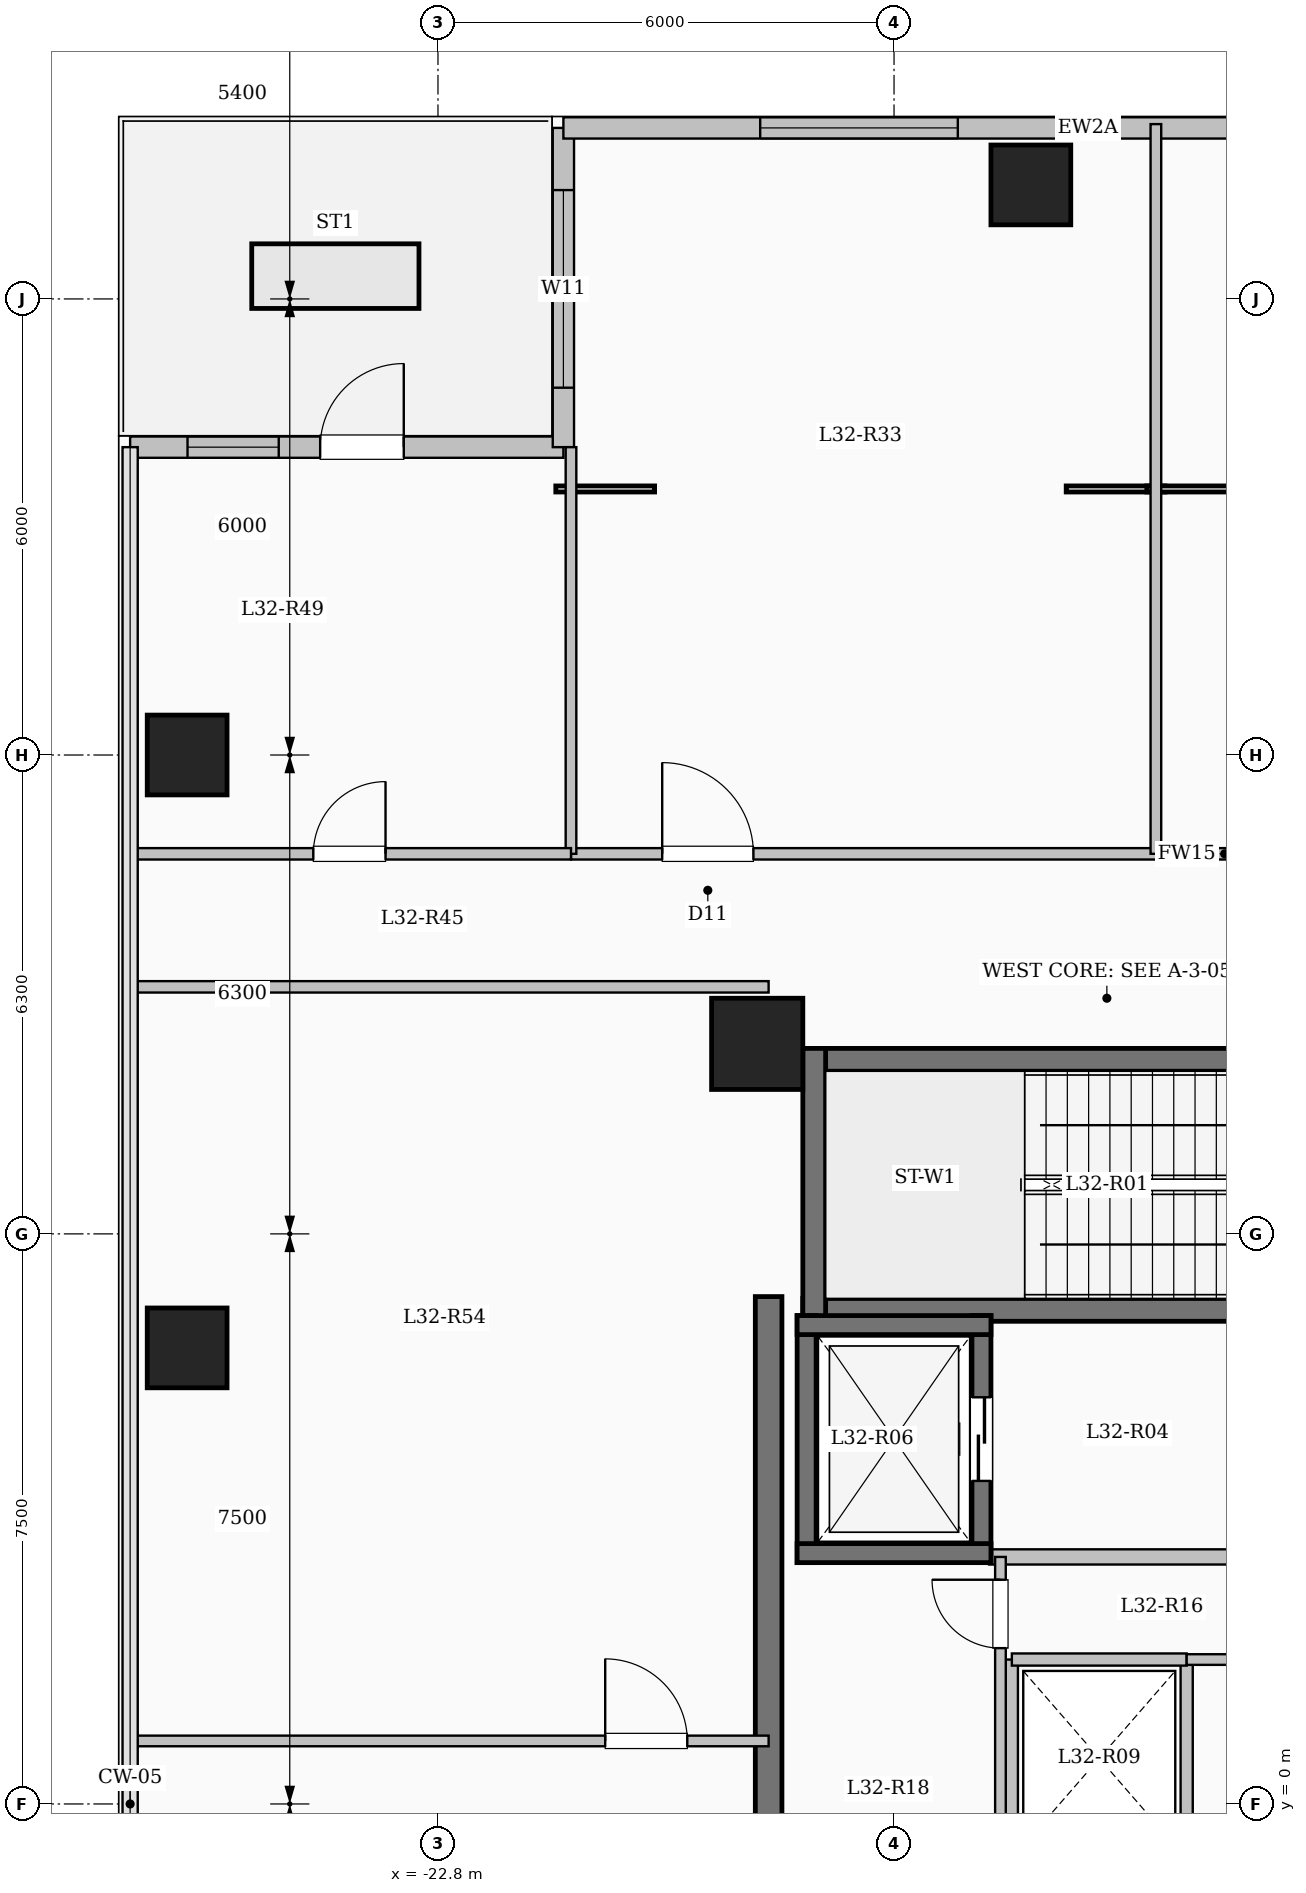
"""IFC4 building model, lengths in metres.
Left out: names, types, materials, properties, quantities, classifications, styles, units other than length and angle.
Written with IfcOpenShell. Run it as: python <this file> out.ifc"""

import sys

from ifc_helpers import new_model, si_unit, direction, frame, frame_2d, origin, origin_2d, place, context, subcontext, project, spatial, rectangle, extrude, element, fill, save


model = new_model("IFC4")
c1 = context("Model", 3, precision=1e-05, world=origin(), true_north=direction((0.0, 1.0)))
c2 = subcontext(c1, "Body", "Model", "MODEL_VIEW")
j1 = project(units=[si_unit("LENGTHUNIT", "METRE"), si_unit("PLANEANGLEUNIT", "RADIAN")], contexts=[c1])
p1 = place(None, origin())
s1 = spatial("IfcSite", under=j1, at=p1, CompositionType="ELEMENT")
p2 = place(p1, origin())
s2 = spatial("IfcBuilding", under=s1, at=p2, CompositionType="ELEMENT")
p3 = place(p2, frame((0.0, 0.0, 118.5)))
s3 = spatial("IfcBuildingStorey", under=s2, at=p3, CompositionType="ELEMENT", Elevation=118.5)
p4 = place(p3, frame((-18.6, 10.0, 0.0), z_axis=(0.0, 0.0, 1.0), x_axis=(1.0, 0.0, 0.0)))
e1 = element("IfcColumn", 1, at=p4, inside=s3, PredefinedType="COLUMN", context=c2, shape_type="SweptSolid", body=[
    extrude(rectangle(XDim=1.2, YDim=1.2, at=origin_2d()), origin(), (0.0, 0.0, 1.0), 4.5),
])
for number, where, z_axis, x_axis in (
    (2, (-15.0, 21.3, 0.0), (0.0, 0.0, 1.0), (1.0, 0.0, 0.0)),
    (3, (-26.1, 6.0, 0.0), (0.0, 0.0, 1.0), (1.0, 0.0, 0.0)),
    (4, (-26.1, 13.8, 0.0), (0.0, 0.0, 1.0), (1.0, 0.0, 0.0)),
):
    element("IfcColumn", number, at=place(p3, frame(where, z_axis=z_axis, x_axis=x_axis)), inside=s3, PredefinedType="COLUMN", context=c2, shape_type="SweptSolid", body=[
        extrude(rectangle(XDim=1.05, YDim=1.05, at=origin_2d()), origin(), (0.0, 0.0, 1.0), 4.5),
    ])
p5 = place(p3, frame((-26.85, 17.85, 0.0), z_axis=(0.0, 0.0, 1.0), x_axis=(1.0, 0.0, 0.0)))
e5 = element("IfcWall", 5, at=p5, inside=s3, PredefinedType="SOLIDWALL", context=c2, shape_type="SweptSolid", body=[
    extrude(rectangle(XDim=5.7, YDim=0.28, at=frame_2d((2.85, 0.0))), origin(), (0.0, 0.0, 1.0), 4.2),
])
p6 = place(p5, frame((2.5, 0.0, 0.0)))
e6 = element("IfcOpeningElement", 6, at=p6, cuts=e5, PredefinedType="OPENING", context=c2, shape_type="SweptSolid", body=[
    extrude(rectangle(XDim=1.1, YDim=2.2, at=frame_2d((0.55, 1.1))), frame((0.0, 0.15, 0.0), z_axis=(0.0, -1.0, 0.0), x_axis=(1.0, 0.0, 0.0)), (0.0, 0.0, 1.0), 0.3),
])
p7 = place(p5, frame((0.755, 0.0, 0.95)))
e7 = element("IfcOpeningElement", 7, at=p7, cuts=e5, PredefinedType="OPENING", context=c2, shape_type="SweptSolid", body=[
    extrude(rectangle(XDim=1.2, YDim=1.5, at=frame_2d((0.6, 0.75))), frame((0.0, 0.15, 0.0), z_axis=(0.0, -1.0, 0.0), x_axis=(1.0, 0.0, 0.0)), (0.0, 0.0, 1.0), 0.3),
])
p8 = place(p3, frame((-21.15, 17.85, 0.0), z_axis=(0.0, 0.0, 1.0), x_axis=(0.0, 1.0, 0.0)))
e8 = element("IfcWall", 8, at=p8, inside=s3, PredefinedType="SOLIDWALL", context=c2, shape_type="SweptSolid", body=[
    extrude(rectangle(XDim=4.2, YDim=0.28, at=frame_2d((2.1, 0.0))), origin(), (0.0, 0.0, 1.0), 4.2),
])
p9 = place(p8, frame((0.782, 0.0, 0.85)))
e9 = element("IfcOpeningElement", 9, at=p9, cuts=e8, PredefinedType="OPENING", context=c2, shape_type="SweptSolid", body=[
    extrude(rectangle(XDim=2.6, YDim=2.4, at=frame_2d((1.3, 1.2))), frame((0.0, 0.15, 0.0), z_axis=(0.0, -1.0, 0.0), x_axis=(1.0, 0.0, 0.0)), (0.0, 0.0, 1.0), 0.3),
])
p10 = place(p3, frame((-21.15, 22.05, 0.0), z_axis=(0.0, 0.0, 1.0), x_axis=(1.0, 0.0, 0.0)))
e10 = element("IfcWall", 10, at=p10, inside=s3, PredefinedType="SOLIDWALL", context=c2, shape_type="SweptSolid", body=[
    extrude(rectangle(XDim=13.8, YDim=0.28, at=frame_2d((6.9, 0.0))), origin(), (0.0, 0.0, 1.0), 4.2),
])
p11 = place(p10, frame((2.589, 0.0, 0.85)))
e11 = element("IfcOpeningElement", 11, at=p11, cuts=e10, PredefinedType="OPENING", context=c2, shape_type="SweptSolid", body=[
    extrude(rectangle(XDim=2.6, YDim=2.4, at=frame_2d((1.3, 1.2))), frame((0.0, 0.15, 0.0), z_axis=(0.0, -1.0, 0.0), x_axis=(1.0, 0.0, 0.0)), (0.0, 0.0, 1.0), 0.3),
])
p12 = place(p10, frame((9.564, 0.0, 0.85)))
e12 = element("IfcOpeningElement", 12, at=p12, cuts=e10, PredefinedType="OPENING", context=c2, shape_type="SweptSolid", body=[
    extrude(rectangle(XDim=2.6, YDim=2.4, at=frame_2d((1.3, 1.2))), frame((0.0, 0.15, 0.0), z_axis=(0.0, -1.0, 0.0), x_axis=(1.0, 0.0, 0.0)), (0.0, 0.0, 1.0), 0.3),
])
p13 = place(p3, frame((-18.0, 9.79, 0.0), z_axis=(0.0, 0.0, 1.0), x_axis=(1.0, 0.0, 0.0)))
e13 = element("IfcWall", 13, at=p13, inside=s3, PredefinedType="SHEAR", context=c2, shape_type="SweptSolid", body=[
    extrude(rectangle(XDim=8.0, YDim=0.3, at=frame_2d((4.0, 0.0))), origin(), (0.0, 0.0, 1.0), 4.5),
])
p14 = place(p3, frame((-18.0, 6.5, 0.0), z_axis=(0.0, 0.0, 1.0), x_axis=(1.0, 0.0, 0.0)))
e14 = element("IfcWall", 14, at=p14, inside=s3, PredefinedType="SHEAR", context=c2, shape_type="SweptSolid", body=[
    extrude(rectangle(XDim=8.0, YDim=0.3, at=frame_2d((4.0, 0.0))), origin(), (0.0, 0.0, 1.0), 4.5),
])
p15 = place(p14, frame((6.45, 0.0, 0.0)))
e15 = element("IfcOpeningElement", 15, at=p15, cuts=e14, PredefinedType="OPENING", context=c2, shape_type="SweptSolid", body=[
    extrude(rectangle(XDim=1.0, YDim=2.15, at=frame_2d((0.5, 1.075))), frame((0.0, 0.16, 0.0), z_axis=(0.0, -1.0, 0.0), x_axis=(1.0, 0.0, 0.0)), (0.0, 0.0, 1.0), 0.32),
])
p16 = place(p3, frame((-17.85, 6.35, 0.0), z_axis=(0.0, 0.0, 1.0), x_axis=(0.0, 1.0, 0.0)))
e16 = element("IfcWall", 16, at=p16, inside=s3, PredefinedType="SHEAR", context=c2, shape_type="SweptSolid", body=[
    extrude(rectangle(XDim=3.59, YDim=0.3, at=frame_2d((1.795, 0.0))), origin(), (0.0, 0.0, 1.0), 4.5),
])
p17 = place(p3, frame((-15.55, 3.25, 0.0), z_axis=(0.0, 0.0, 1.0), x_axis=(1.0, 0.0, 0.0)))
e17 = element("IfcWall", 17, at=p17, inside=s3, PredefinedType="SOLIDWALL", context=c2, shape_type="SweptSolid", body=[
    extrude(rectangle(XDim=5.4, YDim=0.2, at=frame_2d((2.7, 0.0))), origin(), (0.0, 0.0, 1.0), 4.2),
])
p18 = place(p3, frame((-17.95, 3.175, 0.0), z_axis=(0.0, 0.0, 1.0), x_axis=(0.0, 1.0, 0.0)))
e18 = element("IfcWall", 18, at=p18, inside=s3, PredefinedType="SHEAR", context=c2, shape_type="SweptSolid", body=[
    extrude(rectangle(XDim=3.25, YDim=0.25, at=frame_2d((1.625, 0.0))), origin(), (0.0, 0.0, 1.0), 4.5),
])
p19 = place(p3, frame((-15.65, 3.175, 0.0), z_axis=(0.0, 0.0, 1.0), x_axis=(0.0, 1.0, 0.0)))
e19 = element("IfcWall", 19, at=p19, inside=s3, PredefinedType="SHEAR", context=c2, shape_type="SweptSolid", body=[
    extrude(rectangle(XDim=3.25, YDim=0.25, at=frame_2d((1.625, 0.0))), origin(), (0.0, 0.0, 1.0), 4.5),
])
p20 = place(p19, frame((1.075, 0.0, 0.0)))
e20 = element("IfcOpeningElement", 20, at=p20, cuts=e19, PredefinedType="OPENING", context=c2, shape_type="SweptSolid", body=[
    extrude(rectangle(XDim=1.1, YDim=2.15, at=frame_2d((0.55, 1.075))), frame((0.0, 0.135, 0.0), z_axis=(0.0, -1.0, 0.0), x_axis=(1.0, 0.0, 0.0)), (0.0, 0.0, 1.0), 0.27),
])
for number, where, z_axis, x_axis in (
    (21, (-18.075, 3.3, 0.0), (0.0, 0.0, 1.0), (1.0, 0.0, 0.0)),
    (22, (-18.075, 6.3, 0.0), (0.0, 0.0, 1.0), (1.0, 0.0, 0.0)),
):
    element("IfcWall", number, at=place(p3, frame(where, z_axis=z_axis, x_axis=x_axis)), inside=s3, PredefinedType="SHEAR", context=c2, shape_type="SweptSolid", body=[
        extrude(rectangle(XDim=2.55, YDim=0.25, at=frame_2d((1.275, 0.0))), origin(), (0.0, 0.0, 1.0), 4.5),
    ])
for number, where, z_axis, x_axis in (
    (23, (-15.25, -0.7, 0.0), (0.0, 0.0, 1.0), (0.0, 1.0, 0.0)),
    (24, (-12.95, -0.7, 0.0), (0.0, 0.0, 1.0), (0.0, 1.0, 0.0)),
):
    element("IfcWall", number, at=place(p3, frame(where, z_axis=z_axis, x_axis=x_axis)), inside=s3, PredefinedType="SOLIDWALL", context=c2, shape_type="SweptSolid", body=[
        extrude(rectangle(XDim=2.6, YDim=0.16, at=frame_2d((1.3, 0.0))), origin(), (0.0, 0.0, 1.0), 4.2),
    ])
p21 = place(p3, frame((-15.25, 1.9, 0.0), z_axis=(0.0, 0.0, 1.0), x_axis=(1.0, 0.0, 0.0)))
e25 = element("IfcWall", 25, at=p21, inside=s3, PredefinedType="SOLIDWALL", context=c2, shape_type="SweptSolid", body=[
    extrude(rectangle(XDim=2.3, YDim=0.16, at=frame_2d((1.15, 0.0))), origin(), (0.0, 0.0, 1.0), 4.2),
])
p22 = place(p3, frame((-18.45, -7.375, 0.0), z_axis=(0.0, 0.0, 1.0), x_axis=(0.0, 1.0, 0.0)))
e26 = element("IfcWall", 26, at=p22, inside=s3, PredefinedType="SHEAR", context=c2, shape_type="SweptSolid", body=[
    extrude(rectangle(XDim=14.05, YDim=0.35, at=frame_2d((7.025, 0.0))), origin(), (0.0, 0.0, 1.0), 4.5),
])
p23 = place(p3, frame((-12.95, 1.9, 0.0), z_axis=(0.0, 0.0, 1.0), x_axis=(1.0, 0.0, 0.0)))
e27 = element("IfcWall", 27, at=p23, inside=s3, PredefinedType="PARTITIONING", context=c2, shape_type="SweptSolid", body=[
    extrude(rectangle(XDim=2.8, YDim=0.14, at=frame_2d((1.4, 0.0))), origin(), (0.0, 0.0, 1.0), 4.2),
])
p24 = place(p3, frame((-15.4, -7.2, 0.0), z_axis=(0.0, 0.0, 1.0), x_axis=(0.0, 1.0, 0.0)))
e28 = element("IfcWall", 28, at=p24, inside=s3, PredefinedType="PARTITIONING", context=c2, shape_type="SweptSolid", body=[
    extrude(rectangle(XDim=10.45, YDim=0.14, at=frame_2d((5.225, 0.0))), origin(), (0.0, 0.0, 1.0), 4.2),
])
p25 = place(p24, frame((9.25, 0.0, 0.0)))
e29 = element("IfcOpeningElement", 29, at=p25, cuts=e28, PredefinedType="OPENING", context=c2, shape_type="SweptSolid", body=[
    extrude(rectangle(XDim=0.9, YDim=2.08, at=frame_2d((0.45, 1.04))), frame((0.0, 0.08, 0.0), z_axis=(0.0, -1.0, 0.0), x_axis=(1.0, 0.0, 0.0)), (0.0, 0.0, 1.0), 0.16),
])
p26 = place(p3, frame((-21.05, 12.5, 0.0), z_axis=(0.0, 0.0, 1.0), x_axis=(1.0, 0.0, 0.0)))
e30 = element("IfcWall", 30, at=p26, inside=s3, PredefinedType="PARTITIONING", context=c2, shape_type="SweptSolid", body=[
    extrude(rectangle(XDim=17.2, YDim=0.15, at=frame_2d((8.6, 0.0))), origin(), (0.0, 0.0, 1.0), 4.2),
])
p27 = place(p26, frame((1.2, 0.0, 0.0)))
e31 = element("IfcOpeningElement", 31, at=p27, cuts=e30, PredefinedType="OPENING", context=c2, shape_type="SweptSolid", body=[
    extrude(rectangle(XDim=1.2, YDim=2.15, at=frame_2d((0.6, 1.075))), frame((0.0, 0.085, 0.0), z_axis=(0.0, -1.0, 0.0), x_axis=(1.0, 0.0, 0.0)), (0.0, 0.0, 1.0), 0.17),
])
p28 = place(p26, frame((8.795, 0.0, 0.0)))
e32 = element("IfcOpeningElement", 32, at=p28, cuts=e30, PredefinedType="OPENING", context=c2, shape_type="SweptSolid", body=[
    extrude(rectangle(XDim=1.08, YDim=2.15, at=frame_2d((0.54, 1.075))), frame((0.0, 0.085, 0.0), z_axis=(0.0, -1.0, 0.0), x_axis=(1.0, 0.0, 0.0)), (0.0, 0.0, 1.0), 0.17),
])
p29 = place(p3, frame((-13.355, 12.5, 0.0), z_axis=(0.0, 0.0, 1.0), x_axis=(0.0, 1.0, 0.0)))
e33 = element("IfcWall", 33, at=p29, inside=s3, PredefinedType="PARTITIONING", context=c2, shape_type="SweptSolid", body=[
    extrude(rectangle(XDim=9.6, YDim=0.14, at=frame_2d((4.8, 0.0))), origin(), (0.0, 0.0, 1.0), 4.2),
])
p30 = place(p3, frame((-26.88, 10.75, 0.0), z_axis=(0.0, 0.0, 1.0), x_axis=(1.0, 0.0, 0.0)))
e34 = element("IfcWall", 34, at=p30, inside=s3, PredefinedType="PARTITIONING", context=c2, shape_type="SweptSolid", body=[
    extrude(rectangle(XDim=8.43, YDim=0.15, at=frame_2d((4.215, 0.0))), origin(), (0.0, 0.0, 1.0), 4.2),
])
p31 = place(p3, frame((-21.05, 12.5, 0.0), z_axis=(0.0, 0.0, 1.0), x_axis=(0.0, 1.0, 0.0)))
e35 = element("IfcWall", 35, at=p31, inside=s3, PredefinedType="PARTITIONING", context=c2, shape_type="SweptSolid", body=[
    extrude(rectangle(XDim=5.35, YDim=0.14, at=frame_2d((2.675, 0.0))), origin(), (0.0, 0.0, 1.0), 4.2),
])
p32 = place(p3, frame((-26.88, 12.5, 0.0), z_axis=(0.0, 0.0, 1.0), x_axis=(1.0, 0.0, 0.0)))
e36 = element("IfcWall", 36, at=p32, inside=s3, PredefinedType="PARTITIONING", context=c2, shape_type="SweptSolid", body=[
    extrude(rectangle(XDim=5.83, YDim=0.15, at=frame_2d((2.915, 0.0))), origin(), (0.0, 0.0, 1.0), 4.2),
])
p33 = place(p32, frame((2.44, 0.0, 0.0)))
e37 = element("IfcOpeningElement", 37, at=p33, cuts=e36, PredefinedType="OPENING", context=c2, shape_type="SweptSolid", body=[
    extrude(rectangle(XDim=0.95, YDim=2.15, at=frame_2d((0.475, 1.075))), frame((0.0, 0.085, 0.0), z_axis=(0.0, -1.0, 0.0), x_axis=(1.0, 0.0, 0.0)), (0.0, 0.0, 1.0), 0.17),
])
p34 = place(p3, frame((-26.88, 0.829, 0.0), z_axis=(0.0, 0.0, 1.0), x_axis=(1.0, 0.0, 0.0)))
e38 = element("IfcWall", 38, at=p34, inside=s3, PredefinedType="PARTITIONING", context=c2, shape_type="SweptSolid", body=[
    extrude(rectangle(XDim=8.43, YDim=0.14, at=frame_2d((4.215, 0.0))), origin(), (0.0, 0.0, 1.0), 4.2),
])
p35 = place(p34, frame((6.28, 0.0, 0.0)))
e39 = element("IfcOpeningElement", 39, at=p35, cuts=e38, PredefinedType="OPENING", context=c2, shape_type="SweptSolid", body=[
    extrude(rectangle(XDim=1.08, YDim=2.15, at=frame_2d((0.54, 1.075))), frame((0.0, 0.08, 0.0), z_axis=(0.0, -1.0, 0.0), x_axis=(1.0, 0.0, 0.0)), (0.0, 0.0, 1.0), 0.16),
])
p36 = place(p6, origin())
e40 = element("IfcDoor", 40, at=p36, inside=s3, OperationType="SINGLE_SWING_RIGHT", PredefinedType="DOOR", context=c2, shape_type="SweptSolid", body=[
    extrude(rectangle(XDim=1.1, YDim=2.2, at=frame_2d((0.55, 1.1))), frame((0.0, 0.025, 0.0), z_axis=(0.0, -1.0, 0.0), x_axis=(1.0, 0.0, 0.0)), (0.0, 0.0, 1.0), 0.05),
])
fill(e6, e40)
p37 = place(p7, origin())
e41 = element("IfcWindow", 41, at=p37, inside=s3, PartitioningType="SINGLE_PANEL", PredefinedType="WINDOW", context=c2, shape_type="SweptSolid", body=[
    extrude(rectangle(XDim=1.2, YDim=1.5, at=frame_2d((0.6, 0.75))), frame((0.0, 0.03, 0.0), z_axis=(0.0, -1.0, 0.0), x_axis=(1.0, 0.0, 0.0)), (0.0, 0.0, 1.0), 0.06),
])
fill(e7, e41)
p38 = place(p9, origin())
e42 = element("IfcWindow", 42, at=p38, inside=s3, PartitioningType="SINGLE_PANEL", PredefinedType="WINDOW", context=c2, shape_type="SweptSolid", body=[
    extrude(rectangle(XDim=2.6, YDim=2.4, at=frame_2d((1.3, 1.2))), frame((0.0, 0.03, 0.0), z_axis=(0.0, -1.0, 0.0), x_axis=(1.0, 0.0, 0.0)), (0.0, 0.0, 1.0), 0.06),
])
fill(e9, e42)
p39 = place(p11, origin())
e43 = element("IfcWindow", 43, at=p39, inside=s3, PartitioningType="SINGLE_PANEL", PredefinedType="WINDOW", context=c2, shape_type="SweptSolid", body=[
    extrude(rectangle(XDim=2.6, YDim=2.4, at=frame_2d((1.3, 1.2))), frame((0.0, 0.03, 0.0), z_axis=(0.0, -1.0, 0.0), x_axis=(1.0, 0.0, 0.0)), (0.0, 0.0, 1.0), 0.06),
])
fill(e11, e43)
p40 = place(p20, origin())
e44 = element("IfcDoor", 44, at=p40, inside=s3, OperationType="SLIDING_TO_LEFT", PredefinedType="DOOR", context=c2, shape_type="SweptSolid", body=[
    extrude(rectangle(XDim=1.1, YDim=2.15, at=frame_2d((0.55, 1.075))), frame((0.0, 0.025, 0.0), z_axis=(0.0, -1.0, 0.0), x_axis=(1.0, 0.0, 0.0)), (0.0, 0.0, 1.0), 0.05),
])
fill(e20, e44)
p41 = place(p25, origin())
e45 = element("IfcDoor", 45, at=p41, inside=s3, OperationType="SINGLE_SWING_RIGHT", PredefinedType="DOOR", context=c2, shape_type="SweptSolid", body=[
    extrude(rectangle(XDim=0.9, YDim=2.08, at=frame_2d((0.45, 1.04))), frame((0.0, 0.025, 0.0), z_axis=(0.0, -1.0, 0.0), x_axis=(1.0, 0.0, 0.0)), (0.0, 0.0, 1.0), 0.05),
])
fill(e29, e45)
p42 = place(p27, origin())
e46 = element("IfcDoor", 46, at=p42, inside=s3, OperationType="SINGLE_SWING_LEFT", PredefinedType="DOOR", context=c2, shape_type="SweptSolid", body=[
    extrude(rectangle(XDim=1.2, YDim=2.15, at=frame_2d((0.6, 1.075))), frame((0.0, 0.025, 0.0), z_axis=(0.0, -1.0, 0.0), x_axis=(1.0, 0.0, 0.0)), (0.0, 0.0, 1.0), 0.05),
])
fill(e31, e46)
p43 = place(p33, origin())
e47 = element("IfcDoor", 47, at=p43, inside=s3, OperationType="SINGLE_SWING_RIGHT", PredefinedType="DOOR", context=c2, shape_type="SweptSolid", body=[
    extrude(rectangle(XDim=0.95, YDim=2.15, at=frame_2d((0.475, 1.075))), frame((0.0, 0.025, 0.0), z_axis=(0.0, -1.0, 0.0), x_axis=(1.0, 0.0, 0.0)), (0.0, 0.0, 1.0), 0.05),
])
fill(e37, e47)
p44 = place(p35, origin())
e48 = element("IfcDoor", 48, at=p44, inside=s3, OperationType="SINGLE_SWING_LEFT", PredefinedType="DOOR", context=c2, shape_type="SweptSolid", body=[
    extrude(rectangle(XDim=1.08, YDim=2.15, at=frame_2d((0.54, 1.075))), frame((0.0, 0.025, 0.0), z_axis=(0.0, -1.0, 0.0), x_axis=(1.0, 0.0, 0.0)), (0.0, 0.0, 1.0), 0.05),
])
fill(e39, e48)
save(model, sys.argv[1])
